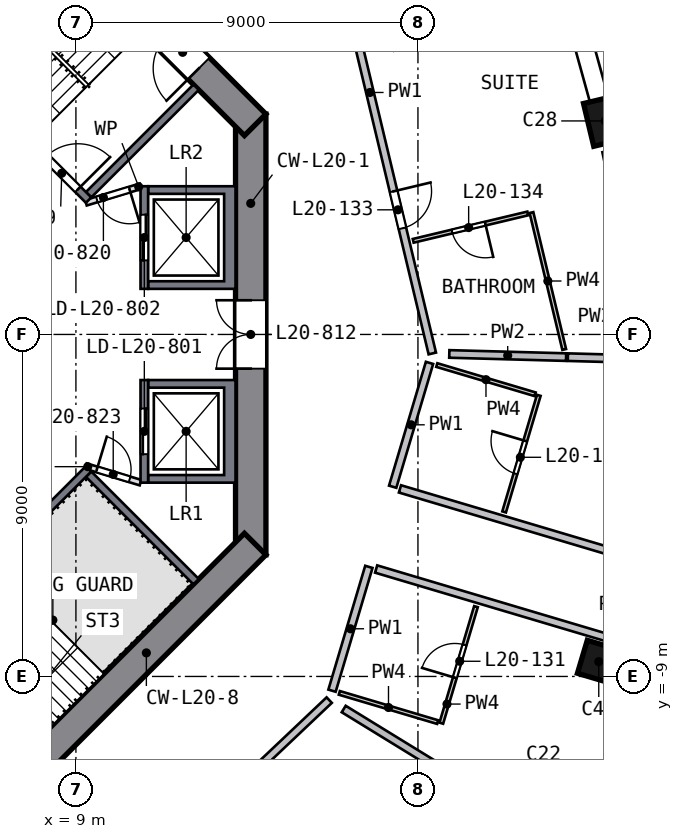
"""IFC4 building model, lengths in metres.
Left out: names, types, materials, properties, quantities, classifications, styles, units other than length and angle.
Written with IfcOpenShell. Run it as: python <this file> out.ifc"""

import sys

from ifc_helpers import new_model, si_unit, direction, frame, frame_2d, origin, origin_2d, place, context, subcontext, project, spatial, polyline, rectangle, outline, extrude, element, fill, save


model = new_model("IFC4")
c1 = context("Model", 3, precision=1e-05, world=origin(), true_north=direction((0.0, 1.0)))
c2 = subcontext(c1, "Body", "Model", "MODEL_VIEW")
j1 = project(units=[si_unit("LENGTHUNIT", "METRE"), si_unit("PLANEANGLEUNIT", "RADIAN")], contexts=[c1])
p1 = place(None, origin())
s1 = spatial("IfcSite", under=j1, at=p1, CompositionType="ELEMENT")
p2 = place(p1, origin())
s2 = spatial("IfcBuilding", under=s1, at=p2, CompositionType="ELEMENT")
p3 = place(p2, frame((0.0, 0.0, 89.5)))
s3 = spatial("IfcBuildingStorey", under=s2, at=p3, CompositionType="ELEMENT", Elevation=89.5)
p4 = place(p3, frame((22.962, 5.487, 0.0), z_axis=(-0.027073959, 0.108980291, 0.993675147), x_axis=(-0.231384883, 0.9663603, -0.112288943)))
e1 = element("IfcColumn", 1, at=p4, inside=s3, PredefinedType="COLUMN", context=c2, shape_type="SweptSolid", body=[
    extrude(rectangle(XDim=1.15, YDim=0.9, at=origin_2d()), origin(), (0.0, 0.0, 1.0), 3.21),
])
p5 = place(p3, frame((22.709, -8.741, 0.0), z_axis=(0.040670924, 0.108329096, 0.993282781), x_axis=(0.958201429, -0.285981296, -0.008044881)))
e2 = element("IfcColumn", 2, at=p5, inside=s3, PredefinedType="COLUMN", context=c2, shape_type="SweptSolid", body=[
    extrude(rectangle(XDim=0.9, YDim=0.9, at=origin_2d()), origin(), (0.0, 0.0, 1.0), 3.211),
])
p6 = place(p3, frame((13.6, -5.799, 0.0), z_axis=(0.0, 0.0, 1.0), x_axis=(0.0, 1.0, 0.0)))
e3 = element("IfcWall", 3, at=p6, inside=s3, PredefinedType="SHEAR", context=c2, shape_type="SweptSolid", body=[
    extrude(rectangle(XDim=11.598, YDim=0.8, at=frame_2d((5.799, 0.0))), origin(), (0.0, 0.0, 1.0), 3.5),
])
p7 = place(p6, frame((4.899, 0.0, 0.0)))
e4 = element("IfcOpeningElement", 4, at=p7, cuts=e3, PredefinedType="OPENING", context=c2, shape_type="SweptSolid", body=[
    extrude(rectangle(XDim=1.8, YDim=2.1, at=frame_2d((0.9, 1.05))), frame((0.0, 0.41, 0.0), z_axis=(0.0, -1.0, 0.0), x_axis=(1.0, 0.0, 0.0)), (0.0, 0.0, 1.0), 0.82),
])
p8 = place(p3, frame((13.717, 5.516, 0.0), z_axis=(0.0, 0.0, 1.0), x_axis=(-0.707106781, 0.707106781, 0.0)))
e5 = element("IfcWall", 5, at=p8, inside=s3, PredefinedType="SHEAR", context=c2, shape_type="SweptSolid", body=[
    extrude(rectangle(XDim=11.598, YDim=0.8, at=frame_2d((5.799, 0.0))), origin(), (0.0, 0.0, 1.0), 3.5),
])
p9 = place(p8, frame((2.099, 0.0, 0.0)))
e6 = element("IfcOpeningElement", 6, at=p9, cuts=e5, PredefinedType="OPENING", context=c2, shape_type="SweptSolid", body=[
    extrude(rectangle(XDim=1.2, YDim=2.1, at=frame_2d((0.6, 1.05))), frame((0.0, 0.41, 0.0), z_axis=(0.0, -1.0, 0.0), x_axis=(1.0, 0.0, 0.0)), (0.0, 0.0, 1.0), 0.82),
])
p10 = place(p3, frame((5.516, -13.717, 0.0), z_axis=(0.0, 0.0, 1.0), x_axis=(0.707106781, 0.707106781, 0.0)))
e7 = element("IfcWall", 7, at=p10, inside=s3, PredefinedType="SHEAR", context=c2, shape_type="SweptSolid", body=[
    extrude(rectangle(XDim=11.598, YDim=0.8, at=frame_2d((5.799, 0.0))), origin(), (0.0, 0.0, 1.0), 3.5),
])
p11 = place(p10, frame((2.099, 0.0, 0.0)))
e8 = element("IfcOpeningElement", 8, at=p11, cuts=e7, PredefinedType="OPENING", context=c2, shape_type="SweptSolid", body=[
    extrude(rectangle(XDim=1.2, YDim=2.1, at=frame_2d((0.6, 1.05))), frame((0.0, 0.41, 0.0), z_axis=(0.0, -1.0, 0.0), x_axis=(1.0, 0.0, 0.0)), (0.0, 0.0, 1.0), 0.82),
])
p12 = place(p3, frame((23.521, 5.621, 0.0), z_axis=(0.0, 0.0, 1.0), x_axis=(-0.232397815, 0.972620818, 0.0)))
e9 = element("IfcWall", 9, at=p12, inside=s3, PredefinedType="SOLIDWALL", context=c2, shape_type="SweptSolid", body=[
    extrude(rectangle(XDim=3.835, YDim=0.15, at=frame_2d((1.918, 0.0))), origin(), (0.0, 0.0, 1.0), 2.425),
])
p13 = place(p12, frame((1.035, 0.0, 0.0)))
e10 = element("IfcOpeningElement", 10, at=p13, cuts=e9, PredefinedType="OPENING", context=c2, shape_type="SweptSolid", body=[
    extrude(rectangle(XDim=2.4, YDim=2.4, at=frame_2d((1.2, 1.2))), frame((0.0, 0.085, 0.0), z_axis=(0.0, -1.0, 0.0), x_axis=(1.0, 0.0, 0.0)), (0.0, 0.0, 1.0), 0.17),
])
p14 = place(p3, origin())
e11 = element("IfcWall", 11, at=p14, inside=s3, PredefinedType="SOLIDWALL", context=c2, shape_type="SweptSolid", body=[
    extrude(outline(polyline([(13.2, -3.9), (10.9, -3.9), (10.9, -3.7), (12.9, -3.7), (12.9, -1.4), (10.9, -1.4), (10.9, -1.2), (13.2, -1.2), (13.2, -3.9)])), origin(), (0.0, 0.0, 1.0), 3.19),
])
p15 = place(p3, frame((10.8, -1.2, 0.0), z_axis=(0.0, 0.0, 1.0), x_axis=(0.0, -1.0, 0.0)))
e12 = element("IfcWall", 12, at=p15, inside=s3, PredefinedType="SOLIDWALL", context=c2, shape_type="SweptSolid", body=[
    extrude(rectangle(XDim=2.7, YDim=0.2, at=frame_2d((1.35, 0.0))), origin(), (0.0, 0.0, 1.0), 3.19),
])
p16 = place(p15, frame((0.75, 0.0, 0.0)))
e13 = element("IfcOpeningElement", 13, at=p16, cuts=e12, PredefinedType="OPENING", context=c2, shape_type="SweptSolid", body=[
    extrude(rectangle(XDim=1.2, YDim=2.1, at=frame_2d((0.6, 1.05))), frame((0.0, 0.11, 0.0), z_axis=(0.0, -1.0, 0.0), x_axis=(1.0, 0.0, 0.0)), (0.0, 0.0, 1.0), 0.22),
])
p17 = place(p3, origin())
e14 = element("IfcWall", 14, at=p17, inside=s3, PredefinedType="SOLIDWALL", context=c2, shape_type="SweptSolid", body=[
    extrude(outline(polyline([(13.2, 3.9), (13.2, 1.2), (10.9, 1.2), (10.9, 1.4), (12.9, 1.4), (12.9, 3.7), (10.9, 3.7), (10.9, 3.9), (13.2, 3.9)])), origin(), (0.0, 0.0, 1.0), 3.19),
])
p18 = place(p3, frame((10.8, 1.2, 0.0), z_axis=(0.0, 0.0, 1.0), x_axis=(0.0, 1.0, 0.0)))
e15 = element("IfcWall", 15, at=p18, inside=s3, PredefinedType="SOLIDWALL", context=c2, shape_type="SweptSolid", body=[
    extrude(rectangle(XDim=2.7, YDim=0.2, at=frame_2d((1.35, 0.0))), origin(), (0.0, 0.0, 1.0), 3.19),
])
p19 = place(p18, frame((0.75, 0.0, 0.0)))
e16 = element("IfcOpeningElement", 16, at=p19, cuts=e15, PredefinedType="OPENING", context=c2, shape_type="SweptSolid", body=[
    extrude(rectangle(XDim=1.2, YDim=2.1, at=frame_2d((0.6, 1.05))), frame((0.0, 0.11, 0.0), z_axis=(0.0, -1.0, 0.0), x_axis=(1.0, 0.0, 0.0)), (0.0, 0.0, 1.0), 0.22),
])
p20 = place(p3, frame((3.535, 9.334, 0.0), z_axis=(0.0, 0.0, 1.0), x_axis=(0.707106781, -0.707106781, 0.0)))
e17 = element("IfcWall", 17, at=p20, inside=s3, PredefinedType="SOLIDWALL", context=c2, shape_type="SweptSolid", body=[
    extrude(rectangle(XDim=8.2, YDim=0.2, at=frame_2d((4.1, 0.0))), origin(), (0.0, 0.0, 1.0), 3.19),
])
p21 = place(p20, frame((6.6, 0.0, 0.0)))
e18 = element("IfcOpeningElement", 18, at=p21, cuts=e17, PredefinedType="OPENING", context=c2, shape_type="SweptSolid", body=[
    extrude(rectangle(XDim=1.2, YDim=2.1, at=frame_2d((0.6, 1.05))), frame((0.0, 0.11, 0.0), z_axis=(0.0, -1.0, 0.0), x_axis=(1.0, 0.0, 0.0)), (0.0, 0.0, 1.0), 0.22),
])
p22 = place(p3, frame((9.334, 3.677, 0.0), z_axis=(0.0, 0.0, 1.0), x_axis=(0.707106781, 0.707106781, 0.0)))
e19 = element("IfcWall", 19, at=p22, inside=s3, PredefinedType="SOLIDWALL", context=c2, shape_type="SweptSolid", body=[
    extrude(rectangle(XDim=4.0, YDim=0.2, at=frame_2d((2.0, 0.0))), origin(), (0.0, 0.0, 1.0), 3.19),
])
p23 = place(p3, frame((9.334, -3.535, 0.0), z_axis=(0.0, 0.0, 1.0), x_axis=(-0.707106781, -0.707106781, 0.0)))
e20 = element("IfcWall", 20, at=p23, inside=s3, PredefinedType="SOLIDWALL", context=c2, shape_type="SweptSolid", body=[
    extrude(rectangle(XDim=8.2, YDim=0.2, at=frame_2d((4.1, 0.0))), origin(), (0.0, 0.0, 1.0), 3.19),
])
p24 = place(p23, frame((6.6, 0.0, 0.0)))
e21 = element("IfcOpeningElement", 21, at=p24, cuts=e20, PredefinedType="OPENING", context=c2, shape_type="SweptSolid", body=[
    extrude(rectangle(XDim=1.2, YDim=2.1, at=frame_2d((0.6, 1.05))), frame((0.0, 0.11, 0.0), z_axis=(0.0, -1.0, 0.0), x_axis=(1.0, 0.0, 0.0)), (0.0, 0.0, 1.0), 0.22),
])
p25 = place(p3, frame((9.334, -3.677, 0.0), z_axis=(0.0, 0.0, 1.0), x_axis=(0.707106781, -0.707106781, 0.0)))
e22 = element("IfcWall", 22, at=p25, inside=s3, PredefinedType="SOLIDWALL", context=c2, shape_type="SweptSolid", body=[
    extrude(rectangle(XDim=4.0, YDim=0.2, at=frame_2d((2.0, 0.0))), origin(), (0.0, 0.0, 1.0), 3.19),
])
p26 = place(p3, frame((10.7, 3.9, 0.0), z_axis=(0.0, 0.0, 1.0), x_axis=(-0.957084567, -0.289808785, 0.0)))
e23 = element("IfcWall", 23, at=p26, inside=s3, PredefinedType="PARTITIONING", context=c2, shape_type="SweptSolid", body=[
    extrude(rectangle(XDim=1.501, YDim=0.15, at=frame_2d((0.75, 0.0))), origin(), (0.0, 0.0, 1.0), 3.19),
])
p27 = place(p26, frame((0.301, 0.0, 0.0)))
e24 = element("IfcOpeningElement", 24, at=p27, cuts=e23, PredefinedType="OPENING", context=c2, shape_type="SweptSolid", body=[
    extrude(rectangle(XDim=0.9, YDim=2.1, at=frame_2d((0.45, 1.05))), frame((0.0, 0.085, 0.0), z_axis=(0.0, -1.0, 0.0), x_axis=(1.0, 0.0, 0.0)), (0.0, 0.0, 1.0), 0.17),
])
p28 = place(p3, frame((9.263, -3.465, 0.0), z_axis=(0.0, 0.0, 1.0), x_axis=(0.957084567, -0.289808785, 0.0)))
e25 = element("IfcWall", 25, at=p28, inside=s3, PredefinedType="PARTITIONING", context=c2, shape_type="SweptSolid", body=[
    extrude(rectangle(XDim=1.501, YDim=0.15, at=frame_2d((0.75, 0.0))), origin(), (0.0, 0.0, 1.0), 3.19),
])
p29 = place(p28, frame((0.301, 0.0, 0.0)))
e26 = element("IfcOpeningElement", 26, at=p29, cuts=e25, PredefinedType="OPENING", context=c2, shape_type="SweptSolid", body=[
    extrude(rectangle(XDim=0.9, YDim=2.1, at=frame_2d((0.45, 1.05))), frame((0.0, 0.085, 0.0), z_axis=(0.0, -1.0, 0.0), x_axis=(1.0, 0.0, 0.0)), (0.0, 0.0, 1.0), 0.17),
])
p30 = place(p3, frame((8.756, -16.166, 0.0), z_axis=(0.0, 0.0, 1.0), x_axis=(0.726098959, 0.687590213, 0.0)))
e27 = element("IfcWall", 27, at=p30, inside=s3, PredefinedType="SOLIDWALL", context=c2, shape_type="SweptSolid", body=[
    extrude(rectangle(XDim=9.516, YDim=0.2, at=frame_2d((4.758, 0.0))), origin(), (0.0, 0.0, 1.0), 3.19),
])
p31 = place(p3, frame((15.739, -9.375, 0.0), z_axis=(0.0, 0.0, 1.0), x_axis=(0.284995231, 0.958528934, 0.0)))
e28 = element("IfcWall", 28, at=p31, inside=s3, PredefinedType="SOLIDWALL", context=c2, shape_type="SweptSolid", body=[
    extrude(rectangle(XDim=3.4, YDim=0.2, at=frame_2d((1.7, 0.0))), origin(), (0.0, 0.0, 1.0), 3.19),
])
p32 = place(p3, frame((16.161, 8.775, 0.0), z_axis=(0.0, 0.0, 1.0), x_axis=(0.232426863, -0.972613877, 0.0)))
e29 = element("IfcWall", 29, at=p32, inside=s3, PredefinedType="SOLIDWALL", context=c2, shape_type="SweptSolid", body=[
    extrude(rectangle(XDim=9.537, YDim=0.2, at=frame_2d((4.768, 0.0))), origin(), (0.0, 0.0, 1.0), 3.19),
])
p33 = place(p32, frame((5.15, 0.0, 0.0)))
e30 = element("IfcOpeningElement", 30, at=p33, cuts=e29, PredefinedType="OPENING", context=c2, shape_type="SweptSolid", body=[
    extrude(rectangle(XDim=1.0, YDim=2.1, at=frame_2d((0.5, 1.05))), frame((0.0, 0.11, 0.0), z_axis=(0.0, -1.0, 0.0), x_axis=(1.0, 0.0, 0.0)), (0.0, 0.0, 1.0), 0.22),
])
p34 = place(p3, frame((17.335, -4.007, 0.0), z_axis=(0.0, 0.0, 1.0), x_axis=(0.284995231, 0.958528934, 0.0)))
e31 = element("IfcWall", 31, at=p34, inside=s3, PredefinedType="SOLIDWALL", context=c2, shape_type="SweptSolid", body=[
    extrude(rectangle(XDim=3.4, YDim=0.2, at=frame_2d((1.7, 0.0))), origin(), (0.0, 0.0, 1.0), 3.19),
])
p35 = place(p3, frame((16.9, -6.173, 0.0), z_axis=(0.0, 0.0, 1.0), x_axis=(0.958523212, -0.285014477, 0.0)))
e32 = element("IfcWall", 32, at=p35, inside=s3, PredefinedType="SOLIDWALL", context=c2, shape_type="SweptSolid", body=[
    extrude(rectangle(XDim=13.165, YDim=0.2, at=frame_2d((6.583, 0.0))), origin(), (0.0, 0.0, 1.0), 3.19),
])
p36 = place(p3, frame((30.146, -7.816, 0.0), z_axis=(0.0, 0.0, 1.0), x_axis=(-0.958521706, 0.285019543, 0.0)))
e33 = element("IfcWall", 33, at=p36, inside=s3, PredefinedType="SOLIDWALL", context=c2, shape_type="SweptSolid", body=[
    extrude(rectangle(XDim=13.165, YDim=0.2, at=frame_2d((6.583, 0.0))), origin(), (0.0, 0.0, 1.0), 3.19),
])
p37 = place(p3, frame((16.047, -9.856, 0.0), z_axis=(0.0, 0.0, 1.0), x_axis=(0.852092728, -0.523390851, 0.0)))
e34 = element("IfcWall", 34, at=p37, inside=s3, PredefinedType="SOLIDWALL", context=c2, shape_type="SweptSolid", body=[
    extrude(rectangle(XDim=6.132, YDim=0.2, at=frame_2d((3.066, 0.0))), origin(), (0.0, 0.0, 1.0), 3.19),
])
p38 = place(p3, frame((18.825, -0.513, 0.0), z_axis=(0.0, 0.0, 1.0), x_axis=(0.999629093, -0.027233739, 0.0)))
e35 = element("IfcWall", 35, at=p38, inside=s3, PredefinedType="SOLIDWALL", context=c2, shape_type="SweptSolid", body=[
    extrude(rectangle(XDim=3.075, YDim=0.2, at=frame_2d((1.538, 0.0))), origin(), (0.0, 0.0, 1.0), 3.19),
])
p39 = place(p3, frame((21.945, -0.598, 0.0), z_axis=(0.0, 0.0, 1.0), x_axis=(0.999628909, -0.027240496, 0.0)))
e36 = element("IfcWall", 36, at=p39, inside=s3, PredefinedType="SOLIDWALL", context=c2, shape_type="SweptSolid", body=[
    extrude(rectangle(XDim=3.011, YDim=0.2, at=frame_2d((1.506, 0.0))), origin(), (0.0, 0.0, 1.0), 2.69),
])
p40 = place(p3, frame((15.931, -9.432, 0.0), z_axis=(0.0, 0.0, 1.0), x_axis=(0.958520333, -0.285024159, 0.0)))
e37 = element("IfcWall", 37, at=p40, inside=s3, PredefinedType="PARTITIONING", context=c2, shape_type="SweptSolid", body=[
    extrude(rectangle(XDim=2.7, YDim=0.1, at=frame_2d((1.35, 0.0))), origin(), (0.0, 0.0, 1.0), 3.19),
])
p41 = place(p3, frame((18.615, -10.23, 0.0), z_axis=(0.0, 0.0, 1.0), x_axis=(0.285023313, 0.958520585, 0.0)))
e38 = element("IfcWall", 38, at=p41, inside=s3, PredefinedType="PARTITIONING", context=c2, shape_type="SweptSolid", body=[
    extrude(rectangle(XDim=3.2, YDim=0.1, at=frame_2d((1.6, 0.0))), origin(), (0.0, 0.0, 1.0), 3.19),
])
p42 = place(p41, frame((1.25, 0.0, 0.0)))
e39 = element("IfcOpeningElement", 39, at=p42, cuts=e38, PredefinedType="OPENING", context=c2, shape_type="SweptSolid", body=[
    extrude(rectangle(XDim=0.9, YDim=2.1, at=frame_2d((0.45, 1.05))), frame((0.0, 0.06, 0.0), z_axis=(0.0, -1.0, 0.0), x_axis=(1.0, 0.0, 0.0)), (0.0, 0.0, 1.0), 0.12),
])
p43 = place(p3, frame((20.89, 3.184, 0.0), z_axis=(0.0, 0.0, 1.0), x_axis=(-0.972619152, -0.232404787, 0.0)))
e40 = element("IfcWall", 40, at=p43, inside=s3, PredefinedType="PARTITIONING", context=c2, shape_type="SweptSolid", body=[
    extrude(rectangle(XDim=3.1, YDim=0.1, at=frame_2d((1.55, 0.0))), origin(), (0.0, 0.0, 1.0), 3.19),
])
p44 = place(p43, frame((1.15, 0.0, 0.0)))
e41 = element("IfcOpeningElement", 41, at=p44, cuts=e40, PredefinedType="OPENING", context=c2, shape_type="SweptSolid", body=[
    extrude(rectangle(XDim=0.9, YDim=2.1, at=frame_2d((0.45, 1.05))), frame((0.0, 0.06, 0.0), z_axis=(0.0, -1.0, 0.0), x_axis=(1.0, 0.0, 0.0)), (0.0, 0.0, 1.0), 0.12),
])
p45 = place(p3, frame((21.084, -1.575, 0.0), z_axis=(0.0, 0.0, 1.0), x_axis=(-0.958520333, 0.285024159, 0.0)))
e42 = element("IfcWall", 42, at=p45, inside=s3, PredefinedType="PARTITIONING", context=c2, shape_type="SweptSolid", body=[
    extrude(rectangle(XDim=2.7, YDim=0.1, at=frame_2d((1.35, 0.0))), origin(), (0.0, 0.0, 1.0), 3.19),
])
p46 = place(p3, frame((20.268, -4.67, 0.0), z_axis=(0.0, 0.0, 1.0), x_axis=(0.285044157, 0.958514386, 0.0)))
e43 = element("IfcWall", 43, at=p46, inside=s3, PredefinedType="PARTITIONING", context=c2, shape_type="SweptSolid", body=[
    extrude(rectangle(XDim=3.2, YDim=0.1, at=frame_2d((1.6, 0.0))), origin(), (0.0, 0.0, 1.0), 3.19),
])
p47 = place(p46, frame((1.05, 0.0, 0.0)))
e44 = element("IfcOpeningElement", 44, at=p47, cuts=e43, PredefinedType="OPENING", context=c2, shape_type="SweptSolid", body=[
    extrude(rectangle(XDim=0.9, YDim=2.1, at=frame_2d((0.45, 1.05))), frame((0.0, 0.06, 0.0), z_axis=(0.0, -1.0, 0.0), x_axis=(1.0, 0.0, 0.0)), (0.0, 0.0, 1.0), 0.12),
])
p48 = place(p3, frame((20.988, 3.208, 0.0), z_axis=(0.0, 0.0, 1.0), x_axis=(0.232410563, -0.972617772, 0.0)))
e45 = element("IfcWall", 45, at=p48, inside=s3, PredefinedType="PARTITIONING", context=c2, shape_type="SweptSolid", body=[
    extrude(rectangle(XDim=3.704, YDim=0.1, at=frame_2d((1.852, 0.0))), origin(), (0.0, 0.0, 1.0), 3.19),
])
p49 = place(p13, origin())
e46 = element("IfcDoor", 46, at=p49, inside=s3, OperationType="SLIDING_TO_LEFT", PredefinedType="DOOR", context=c2, shape_type="SweptSolid", body=[
    extrude(rectangle(XDim=2.4, YDim=2.4, at=frame_2d((1.2, 1.2))), frame((0.0, 0.025, 0.0), z_axis=(0.0, -1.0, 0.0), x_axis=(1.0, 0.0, 0.0)), (0.0, 0.0, 1.0), 0.05),
])
fill(e10, e46)
p50 = place(p16, origin())
e47 = element("IfcDoor", 47, at=p50, inside=s3, OperationType="DOUBLE_DOOR_SLIDING", PredefinedType="DOOR", context=c2, shape_type="SweptSolid", body=[
    extrude(rectangle(XDim=1.2, YDim=2.1, at=frame_2d((0.6, 1.05))), frame((0.0, 0.025, 0.0), z_axis=(0.0, -1.0, 0.0), x_axis=(1.0, 0.0, 0.0)), (0.0, 0.0, 1.0), 0.05),
])
fill(e13, e47)
p51 = place(p19, origin())
e48 = element("IfcDoor", 48, at=p51, inside=s3, OperationType="DOUBLE_DOOR_SLIDING", PredefinedType="DOOR", context=c2, shape_type="SweptSolid", body=[
    extrude(rectangle(XDim=1.2, YDim=2.1, at=frame_2d((0.6, 1.05))), frame((0.0, 0.025, 0.0), z_axis=(0.0, -1.0, 0.0), x_axis=(1.0, 0.0, 0.0)), (0.0, 0.0, 1.0), 0.05),
])
fill(e16, e48)
p52 = place(p21, origin())
e49 = element("IfcDoor", 49, at=p52, inside=s3, OperationType="SINGLE_SWING_RIGHT", PredefinedType="DOOR", context=c2, shape_type="SweptSolid", body=[
    extrude(rectangle(XDim=1.2, YDim=2.1, at=frame_2d((0.6, 1.05))), frame((0.0, 0.025, 0.0), z_axis=(0.0, -1.0, 0.0), x_axis=(1.0, 0.0, 0.0)), (0.0, 0.0, 1.0), 0.05),
])
fill(e18, e49)
p53 = place(p7, origin())
e50 = element("IfcDoor", 50, at=p53, inside=s3, OperationType="DOUBLE_DOOR_SINGLE_SWING", PredefinedType="DOOR", context=c2, shape_type="SweptSolid", body=[
    extrude(rectangle(XDim=1.8, YDim=2.1, at=frame_2d((0.9, 1.05))), frame((0.0, 0.025, 0.0), z_axis=(0.0, -1.0, 0.0), x_axis=(1.0, 0.0, 0.0)), (0.0, 0.0, 1.0), 0.05),
])
fill(e4, e50)
p54 = place(p9, origin())
e51 = element("IfcDoor", 51, at=p54, inside=s3, OperationType="SINGLE_SWING_LEFT", PredefinedType="DOOR", context=c2, shape_type="SweptSolid", body=[
    extrude(rectangle(XDim=1.2, YDim=2.1, at=frame_2d((0.6, 1.05))), frame((0.0, 0.025, 0.0), z_axis=(0.0, -1.0, 0.0), x_axis=(1.0, 0.0, 0.0)), (0.0, 0.0, 1.0), 0.05),
])
fill(e6, e51)
p55 = place(p27, origin())
e52 = element("IfcDoor", 52, at=p55, inside=s3, OperationType="SINGLE_SWING_LEFT", PredefinedType="DOOR", context=c2, shape_type="SweptSolid", body=[
    extrude(rectangle(XDim=0.9, YDim=2.1, at=frame_2d((0.45, 1.05))), frame((0.0, 0.025, 0.0), z_axis=(0.0, -1.0, 0.0), x_axis=(1.0, 0.0, 0.0)), (0.0, 0.0, 1.0), 0.05),
])
fill(e24, e52)
p56 = place(p29, origin())
e53 = element("IfcDoor", 53, at=p56, inside=s3, OperationType="SINGLE_SWING_LEFT", PredefinedType="DOOR", context=c2, shape_type="SweptSolid", body=[
    extrude(rectangle(XDim=0.9, YDim=2.1, at=frame_2d((0.45, 1.05))), frame((0.0, 0.025, 0.0), z_axis=(0.0, -1.0, 0.0), x_axis=(1.0, 0.0, 0.0)), (0.0, 0.0, 1.0), 0.05),
])
fill(e26, e53)
p57 = place(p42, origin())
e54 = element("IfcDoor", 54, at=p57, inside=s3, OperationType="SINGLE_SWING_LEFT", PredefinedType="DOOR", context=c2, shape_type="SweptSolid", body=[
    extrude(rectangle(XDim=0.9, YDim=2.1, at=frame_2d((0.45, 1.05))), frame((0.0, 0.025, 0.0), z_axis=(0.0, -1.0, 0.0), x_axis=(1.0, 0.0, 0.0)), (0.0, 0.0, 1.0), 0.05),
])
fill(e39, e54)
p58 = place(p47, origin())
e55 = element("IfcDoor", 55, at=p58, inside=s3, OperationType="SINGLE_SWING_RIGHT", PredefinedType="DOOR", context=c2, shape_type="SweptSolid", body=[
    extrude(rectangle(XDim=0.9, YDim=2.1, at=frame_2d((0.45, 1.05))), frame((0.0, 0.025, 0.0), z_axis=(0.0, -1.0, 0.0), x_axis=(1.0, 0.0, 0.0)), (0.0, 0.0, 1.0), 0.05),
])
fill(e44, e55)
p59 = place(p33, origin())
e56 = element("IfcDoor", 56, at=p59, inside=s3, OperationType="SINGLE_SWING_LEFT", PredefinedType="DOOR", context=c2, shape_type="SweptSolid", body=[
    extrude(rectangle(XDim=1.0, YDim=2.1, at=frame_2d((0.5, 1.05))), frame((0.0, 0.025, 0.0), z_axis=(0.0, -1.0, 0.0), x_axis=(1.0, 0.0, 0.0)), (0.0, 0.0, 1.0), 0.05),
])
fill(e30, e56)
p60 = place(p44, origin())
e57 = element("IfcDoor", 57, at=p60, inside=s3, OperationType="SINGLE_SWING_LEFT", PredefinedType="DOOR", context=c2, shape_type="SweptSolid", body=[
    extrude(rectangle(XDim=0.9, YDim=2.1, at=frame_2d((0.45, 1.05))), frame((0.0, 0.025, 0.0), z_axis=(0.0, -1.0, 0.0), x_axis=(1.0, 0.0, 0.0)), (0.0, 0.0, 1.0), 0.05),
])
fill(e41, e57)
save(model, sys.argv[1])
